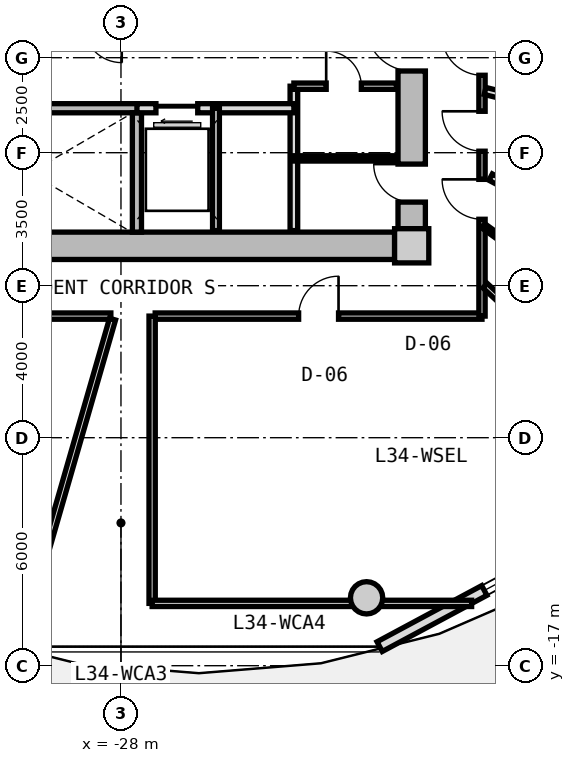
"""IFC4 building model, lengths in metres.
Left out: names, types, materials, properties, quantities, classifications, styles, units other than length and angle.
Written with IfcOpenShell. Run it as: python <this file> out.ifc"""

import sys

from ifc_helpers import new_model, si_unit, direction, frame, frame_2d, origin, origin_2d, place, context, subcontext, project, spatial, rectangle, circle, extrude, source, transform, mapped, element, fill, save


model = new_model("IFC4")
c1 = context("Model", 3, precision=1e-05, world=origin(), true_north=direction((0.0, 1.0)))
c2 = subcontext(c1, "Body", "Model", "MODEL_VIEW")
j1 = project(units=[si_unit("LENGTHUNIT", "METRE"), si_unit("PLANEANGLEUNIT", "RADIAN")], contexts=[c1])
p1 = place(None, origin())
s1 = spatial("IfcSite", under=j1, at=p1, CompositionType="ELEMENT")
p2 = place(p1, origin())
s2 = spatial("IfcBuilding", under=s1, at=p2, CompositionType="ELEMENT")
p3 = place(p2, frame((0.0, 0.0, 111.5)))
s3 = spatial("IfcBuildingStorey", under=s2, at=p3, CompositionType="ELEMENT", Elevation=111.5)
m1 = source(origin(), c2, "Body", "SweptSolid", [
    extrude(rectangle(XDim=0.9, YDim=0.9, at=origin_2d()), origin(), (0.0, 0.0, 1.0), 3.05),
])
p4 = place(p3, frame((-20.35, -5.95, 0.0), z_axis=(0.0, 0.0, 1.0), x_axis=(1.0, 0.0, 0.0)))
e1 = element("IfcColumn", 1, at=p4, inside=s3, PredefinedType="COLUMN", context=c2, shape_type="MappedRepresentation", body=[
    mapped(m1, transform((0.0, 0.0, 0.0), x_axis=(1.0, 0.0, 0.0), y_axis=(0.0, 1.0, 0.0), z_axis=(0.0, 0.0, 1.0), scale=1.0)),
])
m2 = source(origin(), c2, "Body", "SweptSolid", [
    extrude(rectangle(XDim=14.4, YDim=0.72, at=frame_2d((7.2, 0.0))), origin(), (0.0, 0.0, 1.0), 2.79),
])
p5 = place(p3, frame((-20.8, -5.95, 0.0), z_axis=(0.0, 0.0, 1.0), x_axis=(-1.0, 0.0, 0.0)))
e2 = element("IfcWall", 2, at=p5, inside=s3, PredefinedType="SHEAR", context=c2, shape_type="MappedRepresentation", body=[
    mapped(m2, transform((0.0, 0.0, 0.0), x_axis=(1.0, 0.0, 0.0), y_axis=(0.0, 1.0, 0.0), z_axis=(0.0, 0.0, 1.0), scale=1.0)),
])
m3 = source(origin(), c2, "Body", "SweptSolid", [
    extrude(rectangle(XDim=11.0, YDim=0.72, at=frame_2d((5.5, 0.0))), origin(), (0.0, 0.0, 1.0), 2.79),
])
p6 = place(p3, frame((-20.35, 5.5, 0.0), z_axis=(0.0, 0.0, 1.0), x_axis=(0.0, -1.0, 0.0)))
e3 = element("IfcWall", 3, at=p6, inside=s3, PredefinedType="SHEAR", context=c2, shape_type="MappedRepresentation", body=[
    mapped(m3, transform((0.0, 0.0, 0.0), x_axis=(1.0, 0.0, 0.0), y_axis=(0.0, 1.0, 0.0), z_axis=(0.0, 0.0, 1.0), scale=1.0)),
])
p7 = place(p6, frame((5.65, 0.0, 0.0)))
e4 = element("IfcOpeningElement", 4, at=p7, cuts=e3, PredefinedType="OPENING", context=c2, shape_type="SweptSolid", body=[
    extrude(rectangle(XDim=1.2, YDim=2.15, at=frame_2d((0.6, 1.075))), frame((0.0, 0.37, 0.0), z_axis=(0.0, -1.0, 0.0), x_axis=(1.0, 0.0, 0.0)), (0.0, 0.0, 1.0), 0.74),
])
p8 = place(p6, frame((9.3, 0.0, 0.0)))
e5 = element("IfcOpeningElement", 5, at=p8, cuts=e3, PredefinedType="OPENING", context=c2, shape_type="SweptSolid", body=[
    extrude(rectangle(XDim=1.0, YDim=2.1, at=frame_2d((0.5, 1.05))), frame((0.0, 0.37, 0.0), z_axis=(0.0, -1.0, 0.0), x_axis=(1.0, 0.0, 0.0)), (0.0, 0.0, 1.0), 0.74),
])
m4 = source(origin(), c2, "Body", "SweptSolid", [
    extrude(circle(Radius=0.425, at=origin_2d()), origin(), (0.0, 0.0, 1.0), 3.05),
])
p9 = place(p3, frame((-21.537, -15.213, 0.0), z_axis=(0.0, 0.0, 1.0), x_axis=(1.0, 0.0, 0.0)))
e6 = element("IfcColumn", 6, at=p9, inside=s3, PredefinedType="COLUMN", context=c2, shape_type="MappedRepresentation", body=[
    mapped(m4, transform((0.0, 0.0, 0.0), x_axis=(1.0, 0.0, 0.0), y_axis=(0.0, 1.0, 0.0), z_axis=(0.0, 0.0, 1.0), scale=1.0)),
])
m5 = source(origin(), c2, "Body", "SweptSolid", [
    extrude(rectangle(XDim=9.351, YDim=0.29, at=frame_2d((4.675, 0.0))), origin(), (0.0, 0.0, 1.0), 2.79),
])
p10 = place(p3, frame((-12.953, -12.077, 0.0), z_axis=(0.0, 0.0, 1.0), x_axis=(-0.881184411073, -0.472772708267, 0.0)))
e7 = element("IfcWall", 7, at=p10, inside=s3, PredefinedType="SOLIDWALL", context=c2, shape_type="MappedRepresentation", body=[
    mapped(m5, transform((0.0, 0.0, 0.0), x_axis=(1.0, 0.0, 0.0), y_axis=(0.0, 1.0, 0.0), z_axis=(0.0, 0.0, 1.0), scale=1.0)),
])
p11 = place(p10, frame((0.98, 0.0, 0.0)))
e8 = element("IfcOpeningElement", 8, at=p11, cuts=e7, PredefinedType="OPENING", context=c2, shape_type="SweptSolid", body=[
    extrude(rectangle(XDim=1.15, YDim=2.25, at=frame_2d((0.575, 1.125))), frame((0.0, 0.155, 0.0), z_axis=(0.0, -1.0, 0.0), x_axis=(1.0, 0.0, 0.0)), (0.0, 0.0, 1.0), 0.31),
])
p12 = place(p10, frame((5.025, 0.0, 0.85)))
e9 = element("IfcOpeningElement", 9, at=p12, cuts=e7, PredefinedType="OPENING", context=c2, shape_type="SweptSolid", body=[
    extrude(rectangle(XDim=1.2, YDim=1.5, at=frame_2d((0.6, 0.75))), frame((0.0, 0.155, 0.0), z_axis=(0.0, -1.0, 0.0), x_axis=(1.0, 0.0, 0.0)), (0.0, 0.0, 1.0), 0.31),
])
m6 = source(origin(), c2, "Body", "SweptSolid", [
    extrude(rectangle(XDim=7.83, YDim=0.24, at=frame_2d((3.915, 0.0))), origin(), (0.0, 0.0, 1.0), 2.79),
])
p13 = place(p3, frame((-35.29, -2.33, 0.0), z_axis=(0.0, 0.0, 1.0), x_axis=(1.0, 0.0, 0.0)))
e10 = element("IfcWall", 10, at=p13, inside=s3, PredefinedType="PARTITIONING", context=c2, shape_type="MappedRepresentation", body=[
    mapped(m6, transform((0.0, 0.0, 0.0), x_axis=(1.0, 0.0, 0.0), y_axis=(0.0, 1.0, 0.0), z_axis=(0.0, 0.0, 1.0), scale=1.0)),
])
p14 = place(p13, frame((0.95, 0.0, 0.0)))
e11 = element("IfcOpeningElement", 11, at=p14, cuts=e10, PredefinedType="OPENING", context=c2, shape_type="SweptSolid", body=[
    extrude(rectangle(XDim=1.1, YDim=2.15, at=frame_2d((0.55, 1.075))), frame((0.0, 0.13, 0.0), z_axis=(0.0, -1.0, 0.0), x_axis=(1.0, 0.0, 0.0)), (0.0, 0.0, 1.0), 0.26),
])
m7 = source(origin(), c2, "Body", "SweptSolid", [
    extrude(rectangle(XDim=3.14, YDim=0.24, at=frame_2d((1.57, 0.0))), origin(), (0.0, 0.0, 1.0), 2.79),
])
p15 = place(p3, frame((-27.58, -5.59, 0.0), z_axis=(0.0, 0.0, 1.0), x_axis=(0.0, 1.0, 0.0)))
e12 = element("IfcWall", 12, at=p15, inside=s3, PredefinedType="PARTITIONING", context=c2, shape_type="MappedRepresentation", body=[
    mapped(m7, transform((0.0, 0.0, 0.0), x_axis=(1.0, 0.0, 0.0), y_axis=(0.0, 1.0, 0.0), z_axis=(0.0, 0.0, 1.0), scale=1.0)),
])
m8 = source(origin(), c2, "Body", "SweptSolid", [
    extrude(rectangle(XDim=3.8, YDim=0.2, at=frame_2d((1.9, 0.0))), origin(), (0.0, 0.0, 1.0), 2.775),
])
p16 = place(p3, frame((-23.45, -5.55, 0.0), z_axis=(0.0, 0.0, 1.0), x_axis=(0.0, 1.0, 0.0)))
e13 = element("IfcWall", 13, at=p16, inside=s3, PredefinedType="PARTITIONING", context=c2, shape_type="MappedRepresentation", body=[
    mapped(m8, transform((0.0, 0.0, 0.0), x_axis=(1.0, 0.0, 0.0), y_axis=(0.0, 1.0, 0.0), z_axis=(0.0, 0.0, 1.0), scale=1.0)),
])
m9 = source(origin(), c2, "Body", "SweptSolid", [
    extrude(rectangle(XDim=4.13, YDim=0.24, at=frame_2d((2.065, 0.0))), origin(), (0.0, 0.0, 1.0), 2.775),
])
p17 = place(p3, frame((-27.58, -2.33, 0.0), z_axis=(0.0, 0.0, 1.0), x_axis=(1.0, 0.0, 0.0)))
e14 = element("IfcWall", 14, at=p17, inside=s3, PredefinedType="PARTITIONING", context=c2, shape_type="MappedRepresentation", body=[
    mapped(m9, transform((0.0, 0.0, 0.0), x_axis=(1.0, 0.0, 0.0), y_axis=(0.0, 1.0, 0.0), z_axis=(0.0, 0.0, 1.0), scale=1.0)),
])
p18 = place(p17, frame((0.5, 0.0, 0.0)))
e15 = element("IfcOpeningElement", 15, at=p18, cuts=e14, PredefinedType="OPENING", context=c2, shape_type="SweptSolid", body=[
    extrude(rectangle(XDim=1.1, YDim=2.2, at=frame_2d((0.55, 1.1))), frame((0.0, 0.13, 0.0), z_axis=(0.0, -1.0, 0.0), x_axis=(1.0, 0.0, 0.0)), (0.0, 0.0, 1.0), 0.26),
])
m10 = source(origin(), c2, "Body", "SweptSolid", [
    extrude(rectangle(XDim=3.22, YDim=0.18, at=frame_2d((1.61, 0.0))), origin(), (0.0, 0.0, 1.0), 2.775),
])
p19 = place(p3, frame((-25.5, -5.55, 0.0), z_axis=(0.0, 0.0, 1.0), x_axis=(0.0, 1.0, 0.0)))
e16 = element("IfcWall", 16, at=p19, inside=s3, PredefinedType="PARTITIONING", context=c2, shape_type="MappedRepresentation", body=[
    mapped(m10, transform((0.0, 0.0, 0.0), x_axis=(1.0, 0.0, 0.0), y_axis=(0.0, 1.0, 0.0), z_axis=(0.0, 0.0, 1.0), scale=1.0)),
])
m11 = source(origin(), c2, "Body", "SweptSolid", [
    extrude(rectangle(XDim=2.7, YDim=0.165, at=frame_2d((1.35, 0.0))), origin(), (0.0, 0.0, 1.0), 2.775),
])
p20 = place(p3, frame((-23.45, -1.75, 0.0), z_axis=(0.0, 0.0, 1.0), x_axis=(1.0, 0.0, 0.0)))
e17 = element("IfcWall", 17, at=p20, inside=s3, PredefinedType="PARTITIONING", context=c2, shape_type="MappedRepresentation", body=[
    mapped(m11, transform((0.0, 0.0, 0.0), x_axis=(1.0, 0.0, 0.0), y_axis=(0.0, 1.0, 0.0), z_axis=(0.0, 0.0, 1.0), scale=1.0)),
])
p21 = place(p20, frame((0.85, 0.0, 0.0)))
e18 = element("IfcOpeningElement", 18, at=p21, cuts=e17, PredefinedType="OPENING", context=c2, shape_type="SweptSolid", body=[
    extrude(rectangle(XDim=0.925, YDim=2.1, at=frame_2d((0.462, 1.05))), frame((0.0, 0.093, 0.0), z_axis=(0.0, -1.0, 0.0), x_axis=(1.0, 0.0, 0.0)), (0.0, 0.0, 1.0), 0.185),
])
m12 = source(origin(), c2, "Body", "SweptSolid", [
    extrude(rectangle(XDim=2.7, YDim=0.14, at=frame_2d((1.35, 0.0))), origin(), (0.0, 0.0, 1.0), 2.775),
])
p22 = place(p3, frame((-23.45, -3.65, 0.0), z_axis=(0.0, 0.0, 1.0), x_axis=(1.0, 0.0, 0.0)))
e19 = element("IfcWall", 19, at=p22, inside=s3, PredefinedType="PARTITIONING", context=c2, shape_type="MappedRepresentation", body=[
    mapped(m12, transform((0.0, 0.0, 0.0), x_axis=(1.0, 0.0, 0.0), y_axis=(0.0, 1.0, 0.0), z_axis=(0.0, 0.0, 1.0), scale=1.0)),
])
m13 = source(origin(), c2, "Body", "SweptSolid", [
    extrude(rectangle(XDim=8.6, YDim=0.165, at=frame_2d((4.3, 0.0))), origin(), (0.0, 0.0, 1.0), 2.775),
])
p23 = place(p3, frame((-18.5, -7.8, 0.0), z_axis=(0.0, 0.0, 1.0), x_axis=(-1.0, 0.0, 0.0)))
e20 = element("IfcWall", 20, at=p23, inside=s3, PredefinedType="PARTITIONING", context=c2, shape_type="MappedRepresentation", body=[
    mapped(m13, transform((0.0, 0.0, 0.0), x_axis=(1.0, 0.0, 0.0), y_axis=(0.0, 1.0, 0.0), z_axis=(0.0, 0.0, 1.0), scale=1.0)),
])
p24 = place(p23, frame((3.775, 0.0, 0.0)))
e21 = element("IfcOpeningElement", 21, at=p24, cuts=e20, PredefinedType="OPENING", context=c2, shape_type="SweptSolid", body=[
    extrude(rectangle(XDim=1.05, YDim=2.15, at=frame_2d((0.525, 1.075))), frame((0.0, 0.093, 0.0), z_axis=(0.0, -1.0, 0.0), x_axis=(1.0, 0.0, 0.0)), (0.0, 0.0, 1.0), 0.185),
])
m14 = source(origin(), c2, "Body", "SweptSolid", [
    extrude(rectangle(XDim=9.234, YDim=0.165, at=frame_2d((4.617, 0.0))), origin(), (0.0, 0.0, 1.0), 2.775),
])
p25 = place(p3, frame((-28.266, -7.8, 0.0), z_axis=(0.0, 0.0, 1.0), x_axis=(-1.0, 0.0, 0.0)))
e22 = element("IfcWall", 22, at=p25, inside=s3, PredefinedType="PARTITIONING", context=c2, shape_type="MappedRepresentation", body=[
    mapped(m14, transform((0.0, 0.0, 0.0), x_axis=(1.0, 0.0, 0.0), y_axis=(0.0, 1.0, 0.0), z_axis=(0.0, 0.0, 1.0), scale=1.0)),
])
m15 = source(origin(), c2, "Body", "SweptSolid", [
    extrude(rectangle(XDim=15.6, YDim=0.165, at=frame_2d((7.8, 0.0))), origin(), (0.0, 0.0, 1.0), 2.775),
])
p26 = place(p3, frame((-18.5, 7.8, 0.0), z_axis=(0.0, 0.0, 1.0), x_axis=(0.0, -1.0, 0.0)))
e23 = element("IfcWall", 23, at=p26, inside=s3, PredefinedType="PARTITIONING", context=c2, shape_type="MappedRepresentation", body=[
    mapped(m15, transform((0.0, 0.0, 0.0), x_axis=(1.0, 0.0, 0.0), y_axis=(0.0, 1.0, 0.0), z_axis=(0.0, 0.0, 1.0), scale=1.0)),
])
p27 = place(p26, frame((12.002, 0.0, 0.0)))
e24 = element("IfcOpeningElement", 24, at=p27, cuts=e23, PredefinedType="OPENING", context=c2, shape_type="SweptSolid", body=[
    extrude(rectangle(XDim=1.05, YDim=2.15, at=frame_2d((0.525, 1.075))), frame((0.0, 0.093, 0.0), z_axis=(0.0, -1.0, 0.0), x_axis=(1.0, 0.0, 0.0)), (0.0, 0.0, 1.0), 0.185),
])
p28 = place(p26, frame((10.211, 0.0, 0.0)))
e25 = element("IfcOpeningElement", 25, at=p28, cuts=e23, PredefinedType="OPENING", context=c2, shape_type="SweptSolid", body=[
    extrude(rectangle(XDim=1.05, YDim=2.15, at=frame_2d((0.525, 1.075))), frame((0.0, 0.093, 0.0), z_axis=(0.0, -1.0, 0.0), x_axis=(1.0, 0.0, 0.0)), (0.0, 0.0, 1.0), 0.185),
])
p29 = place(p26, frame((8.212, 0.0, 0.0)))
e26 = element("IfcOpeningElement", 26, at=p29, cuts=e23, PredefinedType="OPENING", context=c2, shape_type="SweptSolid", body=[
    extrude(rectangle(XDim=1.05, YDim=2.15, at=frame_2d((0.525, 1.075))), frame((0.0, 0.093, 0.0), z_axis=(0.0, -1.0, 0.0), x_axis=(1.0, 0.0, 0.0)), (0.0, 0.0, 1.0), 0.185),
])
p30 = place(p26, frame((6.291, 0.0, 0.0)))
e27 = element("IfcOpeningElement", 27, at=p30, cuts=e23, PredefinedType="OPENING", context=c2, shape_type="SweptSolid", body=[
    extrude(rectangle(XDim=1.05, YDim=2.15, at=frame_2d((0.525, 1.075))), frame((0.0, 0.093, 0.0), z_axis=(0.0, -1.0, 0.0), x_axis=(1.0, 0.0, 0.0)), (0.0, 0.0, 1.0), 0.185),
])
p31 = place(p26, frame((4.739, 0.0, 0.0)))
e28 = element("IfcOpeningElement", 28, at=p31, cuts=e23, PredefinedType="OPENING", context=c2, shape_type="SweptSolid", body=[
    extrude(rectangle(XDim=0.92, YDim=2.1, at=frame_2d((0.46, 1.05))), frame((0.0, 0.093, 0.0), z_axis=(0.0, -1.0, 0.0), x_axis=(1.0, 0.0, 0.0)), (0.0, 0.0, 1.0), 0.185),
])
p32 = place(p26, frame((2.096, 0.0, 0.0)))
e29 = element("IfcOpeningElement", 29, at=p32, cuts=e23, PredefinedType="OPENING", context=c2, shape_type="SweptSolid", body=[
    extrude(rectangle(XDim=0.92, YDim=2.1, at=frame_2d((0.46, 1.05))), frame((0.0, 0.093, 0.0), z_axis=(0.0, -1.0, 0.0), x_axis=(1.0, 0.0, 0.0)), (0.0, 0.0, 1.0), 0.185),
])
m16 = source(origin(), c2, "Body", "SweptSolid", [
    extrude(rectangle(XDim=8.989, YDim=0.165, at=frame_2d((4.495, 0.0))), origin(), (0.0, 0.0, 1.0), 2.275),
])
p33 = place(p3, frame((-28.222, -7.88, 0.0), z_axis=(0.0, 0.0, 1.0), x_axis=(-0.27702323008, -0.960863221274, 0.0)))
e30 = element("IfcWall", 30, at=p33, inside=s3, PredefinedType="PARTITIONING", context=c2, shape_type="MappedRepresentation", body=[
    mapped(m16, transform((0.0, 0.0, 0.0), x_axis=(1.0, 0.0, 0.0), y_axis=(0.0, 1.0, 0.0), z_axis=(0.0, 0.0, 1.0), scale=1.0)),
])
m17 = source(origin(), c2, "Body", "SweptSolid", [
    extrude(rectangle(XDim=7.482, YDim=0.165, at=frame_2d((3.741, 0.0))), origin(), (0.0, 0.0, 1.0), 2.275),
])
p34 = place(p3, frame((-18.42, -6.998, 0.0), z_axis=(0.0, 0.0, 1.0), x_axis=(0.732508698043, -0.680757671489, 0.0)))
e31 = element("IfcWall", 31, at=p34, inside=s3, PredefinedType="PARTITIONING", context=c2, shape_type="MappedRepresentation", body=[
    mapped(m17, transform((0.0, 0.0, 0.0), x_axis=(1.0, 0.0, 0.0), y_axis=(0.0, 1.0, 0.0), z_axis=(0.0, 0.0, 1.0), scale=1.0)),
])
m18 = source(origin(), c2, "Body", "SweptSolid", [
    extrude(rectangle(XDim=7.56, YDim=0.165, at=frame_2d((3.78, 0.0))), origin(), (0.0, 0.0, 1.0), 2.775),
])
p35 = place(p3, frame((-27.18, -15.36, 0.0), z_axis=(0.0, 0.0, 1.0), x_axis=(0.0, 1.0, 0.0)))
e32 = element("IfcWall", 32, at=p35, inside=s3, PredefinedType="PARTITIONING", context=c2, shape_type="MappedRepresentation", body=[
    mapped(m18, transform((0.0, 0.0, 0.0), x_axis=(1.0, 0.0, 0.0), y_axis=(0.0, 1.0, 0.0), z_axis=(0.0, 0.0, 1.0), scale=1.0)),
])
m19 = source(origin(), c2, "Body", "SweptSolid", [
    extrude(rectangle(XDim=8.407, YDim=0.165, at=frame_2d((4.204, 0.0))), origin(), (0.0, 0.0, 1.0), 2.275),
])
p36 = place(p3, frame((-27.18, -15.36, 0.0), z_axis=(0.0, 0.0, 1.0), x_axis=(1.0, 0.0, 0.0)))
e33 = element("IfcWall", 33, at=p36, inside=s3, PredefinedType="PARTITIONING", context=c2, shape_type="MappedRepresentation", body=[
    mapped(m19, transform((0.0, 0.0, 0.0), x_axis=(1.0, 0.0, 0.0), y_axis=(0.0, 1.0, 0.0), z_axis=(0.0, 0.0, 1.0), scale=1.0)),
])
m20 = source(origin(), c2, "Body", "SweptSolid", [
    extrude(rectangle(XDim=10.556, YDim=0.19, at=frame_2d((5.278, 0.0))), origin(), (0.0, 0.0, 1.0), 2.275),
])
p37 = place(p3, frame((-18.42, -1.875, 0.0), z_axis=(0.0, 0.0, 1.0), x_axis=(0.970363857851, -0.241648470667, 0.0)))
e34 = element("IfcWall", 34, at=p37, inside=s3, PredefinedType="PARTITIONING", context=c2, shape_type="MappedRepresentation", body=[
    mapped(m20, transform((0.0, 0.0, 0.0), x_axis=(1.0, 0.0, 0.0), y_axis=(0.0, 1.0, 0.0), z_axis=(0.0, 0.0, 1.0), scale=1.0)),
])
m21 = source(origin(), c2, "Body", "SweptSolid", [
    extrude(rectangle(XDim=8.744, YDim=0.19, at=frame_2d((4.372, 0.0))), origin(), (0.0, 0.0, 1.0), 2.775),
])
p38 = place(p3, frame((-18.273, -4.142, 0.0), z_axis=(0.0, 0.0, 1.0), x_axis=(0.882252449936, -0.470776607938, 0.0)))
e35 = element("IfcWall", 35, at=p38, inside=s3, PredefinedType="PARTITIONING", context=c2, shape_type="MappedRepresentation", body=[
    mapped(m21, transform((0.0, 0.0, 0.0), x_axis=(1.0, 0.0, 0.0), y_axis=(0.0, 1.0, 0.0), z_axis=(0.0, 0.0, 1.0), scale=1.0)),
])
m22 = source(origin(), c2, "Body", "SweptSolid", [
    extrude(rectangle(XDim=3.621, YDim=0.14, at=frame_2d((1.811, 0.0))), origin(), (0.0, 0.0, 1.0), 2.775),
])
p39 = place(p3, frame((-18.47, -5.422, 0.0), z_axis=(0.0, 0.0, 1.0), x_axis=(0.80968252222, -0.586868139544, 0.0)))
e36 = element("IfcWall", 36, at=p39, inside=s3, PredefinedType="PARTITIONING", context=c2, shape_type="MappedRepresentation", body=[
    mapped(m22, transform((0.0, 0.0, 0.0), x_axis=(1.0, 0.0, 0.0), y_axis=(0.0, 1.0, 0.0), z_axis=(0.0, 0.0, 1.0), scale=1.0)),
])
p40 = place(p39, frame((1.351, 0.0, 0.0)))
e37 = element("IfcOpeningElement", 37, at=p40, cuts=e36, PredefinedType="OPENING", context=c2, shape_type="SweptSolid", body=[
    extrude(rectangle(XDim=0.92, YDim=2.1, at=frame_2d((0.46, 1.05))), frame((0.0, 0.08, 0.0), z_axis=(0.0, -1.0, 0.0), x_axis=(1.0, 0.0, 0.0)), (0.0, 0.0, 1.0), 0.16),
])
m23 = source(origin(), c2, "Body", "SweptSolid", [
    extrude(rectangle(XDim=1.2, YDim=1.5, at=frame_2d((0.6, 0.75))), frame((0.0, 0.03, 0.0), z_axis=(0.0, -1.0, 0.0), x_axis=(1.0, 0.0, 0.0)), (0.0, 0.0, 1.0), 0.06),
])
p41 = place(p12, origin())
e38 = element("IfcWindow", 38, at=p41, inside=s3, PartitioningType="SINGLE_PANEL", PredefinedType="WINDOW", context=c2, shape_type="MappedRepresentation", body=[
    mapped(m23, transform((0.0, 0.0, 0.0), x_axis=(1.0, 0.0, 0.0), y_axis=(0.0, 1.0, 0.0), z_axis=(0.0, 0.0, 1.0), scale=1.0)),
])
fill(e9, e38)
m24 = source(origin(), c2, "Body", "SweptSolid", [
    extrude(rectangle(XDim=1.2, YDim=2.15, at=frame_2d((0.6, 1.075))), frame((0.0, 0.025, 0.0), z_axis=(0.0, -1.0, 0.0), x_axis=(1.0, 0.0, 0.0)), (0.0, 0.0, 1.0), 0.05),
])
p42 = place(p7, frame((1.2, 0.0, 0.0), z_axis=(0.0, 0.0, 1.0), x_axis=(-1.0, 0.0, 0.0)))
e39 = element("IfcDoor", 39, at=p42, inside=s3, OperationType="SINGLE_SWING_RIGHT", PredefinedType="DOOR", context=c2, shape_type="MappedRepresentation", body=[
    mapped(m24, transform((0.0, 0.0, 0.0), x_axis=(1.0, 0.0, 0.0), y_axis=(0.0, 1.0, 0.0), z_axis=(0.0, 0.0, 1.0), scale=1.0)),
])
fill(e4, e39)
m25 = source(origin(), c2, "Body", "SweptSolid", [
    extrude(rectangle(XDim=1.1, YDim=2.2, at=frame_2d((0.55, 1.1))), frame((0.0, 0.025, 0.0), z_axis=(0.0, -1.0, 0.0), x_axis=(1.0, 0.0, 0.0)), (0.0, 0.0, 1.0), 0.05),
])
p43 = place(p18, frame((1.1, 0.0, 0.0), z_axis=(0.0, 0.0, 1.0), x_axis=(-1.0, 0.0, 0.0)))
e40 = element("IfcDoor", 40, at=p43, inside=s3, OperationType="SLIDING_TO_LEFT", PredefinedType="DOOR", context=c2, shape_type="MappedRepresentation", body=[
    mapped(m25, transform((0.0, 0.0, 0.0), x_axis=(1.0, 0.0, 0.0), y_axis=(0.0, 1.0, 0.0), z_axis=(0.0, 0.0, 1.0), scale=1.0)),
])
fill(e15, e40)
m26 = source(origin(), c2, "Body", "SweptSolid", [
    extrude(rectangle(XDim=0.925, YDim=2.1, at=frame_2d((0.462, 1.05))), frame((0.0, 0.025, 0.0), z_axis=(0.0, -1.0, 0.0), x_axis=(1.0, 0.0, 0.0)), (0.0, 0.0, 1.0), 0.05),
])
p44 = place(p21, origin())
e41 = element("IfcDoor", 41, at=p44, inside=s3, OperationType="SINGLE_SWING_LEFT", PredefinedType="DOOR", context=c2, shape_type="MappedRepresentation", body=[
    mapped(m26, transform((0.0, 0.0, 0.0), x_axis=(1.0, 0.0, 0.0), y_axis=(0.0, 1.0, 0.0), z_axis=(0.0, 0.0, 1.0), scale=1.0)),
])
fill(e18, e41)
m27 = source(origin(), c2, "Body", "SweptSolid", [
    extrude(rectangle(XDim=1.0, YDim=2.1, at=frame_2d((0.5, 1.05))), frame((0.0, 0.025, 0.0), z_axis=(0.0, -1.0, 0.0), x_axis=(1.0, 0.0, 0.0)), (0.0, 0.0, 1.0), 0.05),
])
p45 = place(p8, frame((1.0, 0.0, 0.0), z_axis=(0.0, 0.0, 1.0), x_axis=(-1.0, 0.0, 0.0)))
e42 = element("IfcDoor", 42, at=p45, inside=s3, OperationType="SINGLE_SWING_RIGHT", PredefinedType="DOOR", context=c2, shape_type="MappedRepresentation", body=[
    mapped(m27, transform((0.0, 0.0, 0.0), x_axis=(1.0, 0.0, 0.0), y_axis=(0.0, 1.0, 0.0), z_axis=(0.0, 0.0, 1.0), scale=1.0)),
])
fill(e5, e42)
m28 = source(origin(), c2, "Body", "SweptSolid", [
    extrude(rectangle(XDim=1.05, YDim=2.15, at=frame_2d((0.525, 1.075))), frame((0.0, 0.025, 0.0), z_axis=(0.0, -1.0, 0.0), x_axis=(1.0, 0.0, 0.0)), (0.0, 0.0, 1.0), 0.05),
])
p46 = place(p24, frame((1.05, 0.0, 0.0), z_axis=(0.0, 0.0, 1.0), x_axis=(-1.0, 0.0, 0.0)))
e43 = element("IfcDoor", 43, at=p46, inside=s3, OperationType="SINGLE_SWING_RIGHT", PredefinedType="DOOR", context=c2, shape_type="MappedRepresentation", body=[
    mapped(m28, transform((0.0, 0.0, 0.0), x_axis=(1.0, 0.0, 0.0), y_axis=(0.0, 1.0, 0.0), z_axis=(0.0, 0.0, 1.0), scale=1.0)),
])
fill(e21, e43)
p47 = place(p27, frame((1.05, 0.0, 0.0), z_axis=(0.0, 0.0, 1.0), x_axis=(-1.0, 0.0, 0.0)))
e44 = element("IfcDoor", 44, at=p47, inside=s3, OperationType="SINGLE_SWING_RIGHT", PredefinedType="DOOR", context=c2, shape_type="MappedRepresentation", body=[
    mapped(m28, transform((0.0, 0.0, 0.0), x_axis=(1.0, 0.0, 0.0), y_axis=(0.0, 1.0, 0.0), z_axis=(0.0, 0.0, 1.0), scale=1.0)),
])
fill(e24, e44)
p48 = place(p28, frame((1.05, 0.0, 0.0), z_axis=(0.0, 0.0, 1.0), x_axis=(-1.0, 0.0, 0.0)))
e45 = element("IfcDoor", 45, at=p48, inside=s3, OperationType="SINGLE_SWING_RIGHT", PredefinedType="DOOR", context=c2, shape_type="MappedRepresentation", body=[
    mapped(m28, transform((0.0, 0.0, 0.0), x_axis=(1.0, 0.0, 0.0), y_axis=(0.0, 1.0, 0.0), z_axis=(0.0, 0.0, 1.0), scale=1.0)),
])
fill(e25, e45)
p49 = place(p29, frame((1.05, 0.0, 0.0), z_axis=(0.0, 0.0, 1.0), x_axis=(-1.0, 0.0, 0.0)))
e46 = element("IfcDoor", 46, at=p49, inside=s3, OperationType="SINGLE_SWING_RIGHT", PredefinedType="DOOR", context=c2, shape_type="MappedRepresentation", body=[
    mapped(m28, transform((0.0, 0.0, 0.0), x_axis=(1.0, 0.0, 0.0), y_axis=(0.0, 1.0, 0.0), z_axis=(0.0, 0.0, 1.0), scale=1.0)),
])
fill(e26, e46)
save(model, sys.argv[1])
